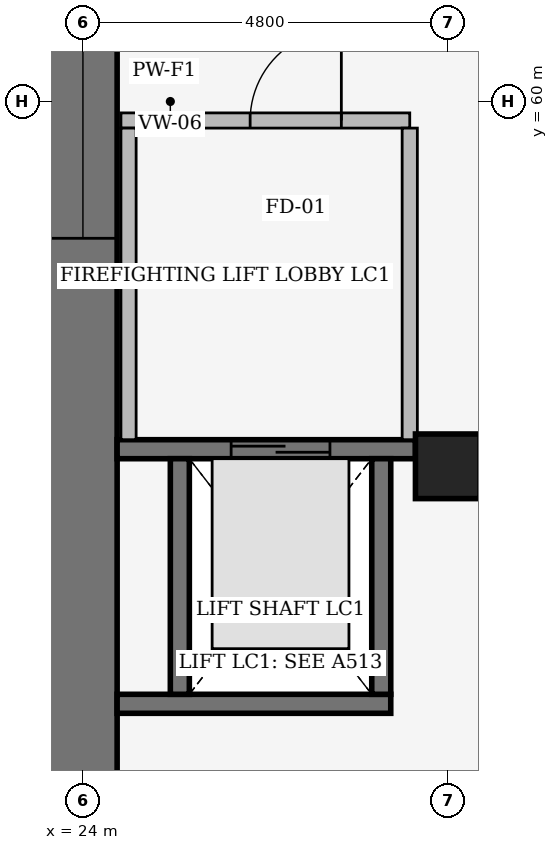
"""IFC4 building model, lengths in metres.
Left out: names, types, materials, properties, quantities, classifications, styles, units other than length and angle.
Written with IfcOpenShell. Run it as: python <this file> out.ifc"""

import sys

from ifc_helpers import new_model, si_unit, direction, frame, frame_2d, origin, origin_2d, place, context, subcontext, project, spatial, rectangle, extrude, element, fill, save


model = new_model("IFC4")
c1 = context("Model", 3, precision=1e-05, world=origin(), true_north=direction((0.0, 1.0)))
c2 = subcontext(c1, "Body", "Model", "MODEL_VIEW")
j1 = project(units=[si_unit("LENGTHUNIT", "METRE"), si_unit("PLANEANGLEUNIT", "RADIAN")], contexts=[c1])
p1 = place(None, origin())
s1 = spatial("IfcSite", under=j1, at=p1, CompositionType="ELEMENT")
p2 = place(p1, origin())
s2 = spatial("IfcBuilding", under=s1, at=p2, CompositionType="ELEMENT")
p3 = place(p2, frame((0.0, 0.0, 5.4)))
s3 = spatial("IfcBuildingStorey", under=s2, at=p3, CompositionType="ELEMENT", Elevation=5.4)
p4 = place(p3, frame((28.8, 55.2, 0.0), z_axis=(0.0, 0.0, 1.0), x_axis=(1.0, 0.0, 0.0)))
e1 = element("IfcColumn", 1, at=p4, inside=s3, PredefinedType="COLUMN", context=c2, shape_type="SweptSolid", body=[
    extrude(rectangle(XDim=0.85, YDim=0.85, at=origin_2d()), origin(), (0.0, 0.0, 1.0), 5.1),
])
p5 = place(p3, frame((24.0, 50.85, 0.0), z_axis=(0.0, 0.0, 1.0), x_axis=(0.0, 1.0, 0.0)))
e2 = element("IfcWall", 2, at=p5, inside=s3, PredefinedType="SOLIDWALL", context=c2, shape_type="SweptSolid", body=[
    extrude(rectangle(XDim=18.3, YDim=0.9, at=frame_2d((9.15, 0.0))), origin(), (0.0, 0.0, 1.0), 3.8),
])
p6 = place(p5, frame((7.35, 0.0, 0.65)))
e3 = element("IfcOpeningElement", 3, at=p6, cuts=e2, PredefinedType="OPENING", context=c2, shape_type="SweptSolid", body=[
    extrude(rectangle(XDim=3.6, YDim=2.5, at=frame_2d((1.8, 1.25))), frame((0.0, 0.46, 0.0), z_axis=(0.0, -1.0, 0.0), x_axis=(1.0, 0.0, 0.0)), (0.0, 0.0, 1.0), 0.92),
])
p7 = place(p3, frame((24.45, 52.075, 0.0), z_axis=(0.0, 0.0, 1.0), x_axis=(1.0, 0.0, 0.0)))
e4 = element("IfcWall", 4, at=p7, inside=s3, PredefinedType="SHEAR", context=c2, shape_type="SweptSolid", body=[
    extrude(rectangle(XDim=3.6, YDim=0.25, at=frame_2d((1.8, 0.0))), origin(), (0.0, 0.0, 1.0), 4.7),
])
p8 = place(p3, frame((24.45, 55.425, 0.0), z_axis=(0.0, 0.0, 1.0), x_axis=(1.0, 0.0, 0.0)))
e5 = element("IfcWall", 5, at=p8, inside=s3, PredefinedType="SHEAR", context=c2, shape_type="SweptSolid", body=[
    extrude(rectangle(XDim=3.925, YDim=0.25, at=frame_2d((1.962, 0.0))), origin(), (0.0, 0.0, 1.0), 4.7),
])
p9 = place(p8, frame((1.5, 0.0, 0.0)))
e6 = element("IfcOpeningElement", 6, at=p9, cuts=e5, PredefinedType="OPENING", context=c2, shape_type="SweptSolid", body=[
    extrude(rectangle(XDim=1.3, YDim=2.2, at=frame_2d((0.65, 1.1))), frame((0.0, 0.135, 0.0), z_axis=(0.0, -1.0, 0.0), x_axis=(1.0, 0.0, 0.0)), (0.0, 0.0, 1.0), 0.27),
])
for number, where, z_axis, x_axis in (
    (7, (25.275, 52.2, 0.0), (0.0, 0.0, 1.0), (0.0, 1.0, 0.0)),
    (8, (27.925, 52.2, 0.0), (0.0, 0.0, 1.0), (0.0, 1.0, 0.0)),
):
    element("IfcWall", number, at=place(p3, frame(where, z_axis=z_axis, x_axis=x_axis)), inside=s3, PredefinedType="SHEAR", context=c2, shape_type="SweptSolid", body=[
        extrude(rectangle(XDim=3.1, YDim=0.25, at=frame_2d((1.55, 0.0))), origin(), (0.0, 0.0, 1.0), 4.7),
    ])
p10 = place(p3, frame((24.5, 59.75, 0.0), z_axis=(0.0, 0.0, 1.0), x_axis=(1.0, 0.0, 0.0)))
e9 = element("IfcWall", 9, at=p10, inside=s3, PredefinedType="PARTITIONING", context=c2, shape_type="SweptSolid", body=[
    extrude(rectangle(XDim=3.8, YDim=0.2, at=frame_2d((1.9, 0.0))), origin(), (0.0, 0.0, 1.0), 4.74),
])
p11 = place(p10, frame((1.7, 0.0, 0.0)))
e10 = element("IfcOpeningElement", 10, at=p11, cuts=e9, PredefinedType="OPENING", context=c2, shape_type="SweptSolid", body=[
    extrude(rectangle(XDim=1.2, YDim=2.2, at=frame_2d((0.6, 1.1))), frame((0.0, 0.11, 0.0), z_axis=(0.0, -1.0, 0.0), x_axis=(1.0, 0.0, 0.0)), (0.0, 0.0, 1.0), 0.22),
])
for number, where, z_axis, x_axis in (
    (11, (24.6, 55.55, 0.0), (0.0, 0.0, 1.0), (0.0, 1.0, 0.0)),
    (12, (28.3, 55.55, 0.0), (0.0, 0.0, 1.0), (0.0, 1.0, 0.0)),
):
    element("IfcWall", number, at=place(p3, frame(where, z_axis=z_axis, x_axis=x_axis)), inside=s3, PredefinedType="PARTITIONING", context=c2, shape_type="SweptSolid", body=[
        extrude(rectangle(XDim=4.1, YDim=0.2, at=frame_2d((2.05, 0.0))), origin(), (0.0, 0.0, 1.0), 4.74),
    ])
p12 = place(p6, origin())
e13 = element("IfcWindow", 13, at=p12, inside=s3, PartitioningType="SINGLE_PANEL", PredefinedType="WINDOW", context=c2, shape_type="SweptSolid", body=[
    extrude(rectangle(XDim=3.6, YDim=2.5, at=frame_2d((1.8, 1.25))), frame((0.0, 0.03, 0.0), z_axis=(0.0, -1.0, 0.0), x_axis=(1.0, 0.0, 0.0)), (0.0, 0.0, 1.0), 0.06),
])
fill(e3, e13)
p13 = place(p9, origin())
e14 = element("IfcDoor", 14, at=p13, inside=s3, OperationType="DOUBLE_DOOR_SLIDING", PredefinedType="DOOR", context=c2, shape_type="SweptSolid", body=[
    extrude(rectangle(XDim=1.3, YDim=2.2, at=frame_2d((0.65, 1.1))), frame((0.0, 0.025, 0.0), z_axis=(0.0, -1.0, 0.0), x_axis=(1.0, 0.0, 0.0)), (0.0, 0.0, 1.0), 0.05),
])
fill(e6, e14)
p14 = place(p11, origin())
e15 = element("IfcDoor", 15, at=p14, inside=s3, OperationType="SINGLE_SWING_RIGHT", PredefinedType="DOOR", context=c2, shape_type="SweptSolid", body=[
    extrude(rectangle(XDim=1.2, YDim=2.2, at=frame_2d((0.6, 1.1))), frame((0.0, 0.025, 0.0), z_axis=(0.0, -1.0, 0.0), x_axis=(1.0, 0.0, 0.0)), (0.0, 0.0, 1.0), 0.05),
])
fill(e10, e15)
save(model, sys.argv[1])
